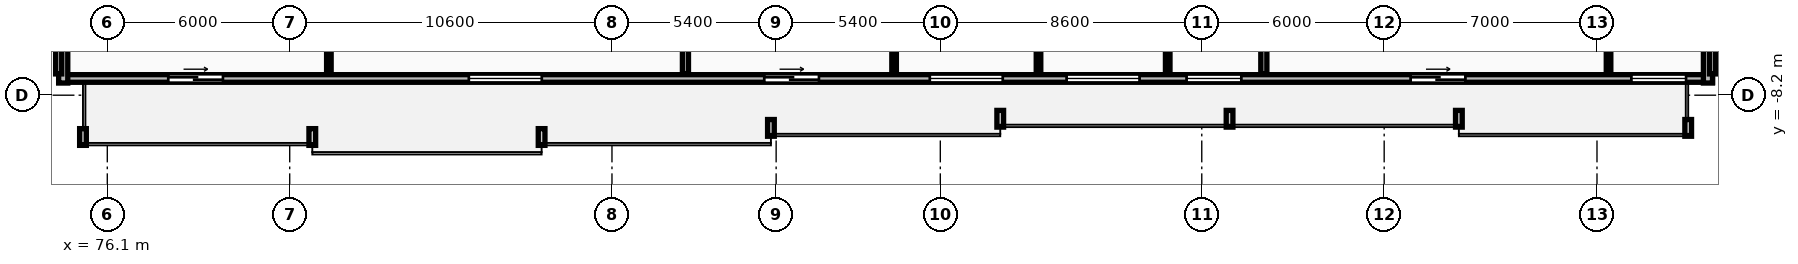
"""IFC4 building model, lengths in metres.
Left out: names, types, materials, properties, quantities, classifications, styles, units other than length and angle.
Written with IfcOpenShell. Run it as: python <this file> out.ifc"""

import sys

from ifc_helpers import new_model, si_unit, direction, frame, frame_2d, origin, place, context, subcontext, project, spatial, rectangle, extrude, element, fill, save


model = new_model("IFC4")
c1 = context("Model", 3, precision=1e-05, world=origin(), true_north=direction((0.0, 1.0)))
c2 = subcontext(c1, "Body", "Model", "MODEL_VIEW")
j1 = project(units=[si_unit("LENGTHUNIT", "METRE"), si_unit("PLANEANGLEUNIT", "RADIAN")], contexts=[c1])
p1 = place(None, origin())
s1 = spatial("IfcSite", under=j1, at=p1, CompositionType="ELEMENT")
p2 = place(p1, origin())
s2 = spatial("IfcBuilding", under=s1, at=p2, CompositionType="ELEMENT")
p3 = place(p2, frame((0.0, 0.0, 201.1)))
s3 = spatial("IfcBuildingStorey", under=s2, at=p3, CompositionType="ELEMENT", Elevation=201.1)
p4 = place(p3, frame((74.5, -7.65, 0.0), z_axis=(0.0, 0.0, 1.0), x_axis=(1.0, 0.0, 0.0)))
e1 = element("IfcWall", 1, at=p4, inside=s3, PredefinedType="STANDARD", context=c2, shape_type="SweptSolid", body=[
    extrude(rectangle(XDim=54.4, YDim=0.25, at=frame_2d((27.2, 0.0))), origin(), (0.0, 0.0, 1.0), 2.97),
])
p5 = place(p4, frame((3.604, 0.0, 0.0)))
e2 = element("IfcOpeningElement", 2, at=p5, cuts=e1, PredefinedType="OPENING", context=c2, shape_type="SweptSolid", body=[
    extrude(rectangle(XDim=1.8, YDim=2.2, at=frame_2d((0.9, 1.1))), frame((0.0, 0.135, 0.0), z_axis=(0.0, -1.0, 0.0), x_axis=(1.0, 0.0, 0.0)), (0.0, 0.0, 1.0), 0.27),
])
p6 = place(p4, frame((13.492, 0.0, 0.85)))
e3 = element("IfcOpeningElement", 3, at=p6, cuts=e1, PredefinedType="OPENING", context=c2, shape_type="SweptSolid", body=[
    extrude(rectangle(XDim=2.4, YDim=1.9, at=frame_2d((1.2, 0.95))), frame((0.0, 0.135, 0.0), z_axis=(0.0, -1.0, 0.0), x_axis=(1.0, 0.0, 0.0)), (0.0, 0.0, 1.0), 0.27),
])
p7 = place(p4, frame((28.655, 0.0, 0.85)))
e4 = element("IfcOpeningElement", 4, at=p7, cuts=e1, PredefinedType="OPENING", context=c2, shape_type="SweptSolid", body=[
    extrude(rectangle(XDim=2.4, YDim=1.9, at=frame_2d((1.2, 0.95))), frame((0.0, 0.135, 0.0), z_axis=(0.0, -1.0, 0.0), x_axis=(1.0, 0.0, 0.0)), (0.0, 0.0, 1.0), 0.27),
])
p8 = place(p4, frame((33.155, 0.0, 0.85)))
e5 = element("IfcOpeningElement", 5, at=p8, cuts=e1, PredefinedType="OPENING", context=c2, shape_type="SweptSolid", body=[
    extrude(rectangle(XDim=2.4, YDim=1.9, at=frame_2d((1.2, 0.95))), frame((0.0, 0.135, 0.0), z_axis=(0.0, -1.0, 0.0), x_axis=(1.0, 0.0, 0.0)), (0.0, 0.0, 1.0), 0.27),
])
p9 = place(p4, frame((23.208, 0.0, 0.0)))
e6 = element("IfcOpeningElement", 6, at=p9, cuts=e1, PredefinedType="OPENING", context=c2, shape_type="SweptSolid", body=[
    extrude(rectangle(XDim=1.8, YDim=2.2, at=frame_2d((0.9, 1.1))), frame((0.0, 0.135, 0.0), z_axis=(0.0, -1.0, 0.0), x_axis=(1.0, 0.0, 0.0)), (0.0, 0.0, 1.0), 0.27),
])
p10 = place(p4, frame((37.101, 0.0, 0.85)))
e7 = element("IfcOpeningElement", 7, at=p10, cuts=e1, PredefinedType="OPENING", context=c2, shape_type="SweptSolid", body=[
    extrude(rectangle(XDim=1.8, YDim=1.8, at=frame_2d((0.9, 0.9))), frame((0.0, 0.135, 0.0), z_axis=(0.0, -1.0, 0.0), x_axis=(1.0, 0.0, 0.0)), (0.0, 0.0, 1.0), 0.27),
])
p11 = place(p4, frame((44.471, 0.0, 0.0)))
e8 = element("IfcOpeningElement", 8, at=p11, cuts=e1, PredefinedType="OPENING", context=c2, shape_type="SweptSolid", body=[
    extrude(rectangle(XDim=1.8, YDim=2.2, at=frame_2d((0.9, 1.1))), frame((0.0, 0.135, 0.0), z_axis=(0.0, -1.0, 0.0), x_axis=(1.0, 0.0, 0.0)), (0.0, 0.0, 1.0), 0.27),
])
p12 = place(p4, frame((51.73, 0.0, 0.85)))
e9 = element("IfcOpeningElement", 9, at=p12, cuts=e1, PredefinedType="OPENING", context=c2, shape_type="SweptSolid", body=[
    extrude(rectangle(XDim=1.8, YDim=1.8, at=frame_2d((0.9, 0.9))), frame((0.0, 0.135, 0.0), z_axis=(0.0, -1.0, 0.0), x_axis=(1.0, 0.0, 0.0)), (0.0, 0.0, 1.0), 0.27),
])
for number, where, z_axis, x_axis in (
    (10, (128.75, -7.8, 0.0), (0.0, 0.0, 1.0), (0.0, 1.0, 0.0)),
    (11, (74.65, -4.2, 0.0), (0.0, 0.0, 1.0), (0.0, -1.0, 0.0)),
):
    element("IfcWall", number, at=place(p3, frame(where, z_axis=z_axis, x_axis=x_axis)), inside=s3, PredefinedType="STANDARD", context=c2, shape_type="SweptSolid", body=[
        extrude(rectangle(XDim=3.6, YDim=0.3, at=frame_2d((1.8, 0.0))), origin(), (0.0, 0.0, 1.0), 2.97),
    ])
for number, where, z_axis, x_axis in (
    (12, (74.5, -7.5, 0.0), (0.0, 0.0, 1.0), (0.0, 1.0, 0.0)),
    (13, (128.9, -7.5, 0.0), (0.0, 0.0, 1.0), (0.0, 1.0, 0.0)),
):
    element("IfcWall", number, at=place(p3, frame(where, z_axis=z_axis, x_axis=x_axis)), inside=s3, PredefinedType="PARTITIONING", context=c2, shape_type="SweptSolid", body=[
        extrude(rectangle(XDim=23.07, YDim=0.2, at=frame_2d((11.535, 0.0))), origin(), (0.0, 0.0, 1.0), 2.2),
    ])
p13 = place(p3, frame((95.117, -7.5, 0.0), z_axis=(0.0, 0.0, 1.0), x_axis=(0.0, 1.0, 0.0)))
e14 = element("IfcWall", 14, at=p13, inside=s3, PredefinedType="PARTITIONING", context=c2, shape_type="SweptSolid", body=[
    extrude(rectangle(XDim=23.07, YDim=0.2, at=frame_2d((11.535, 0.0))), origin(), (0.0, 0.0, 1.0), 2.97),
])
p14 = place(p3, frame((83.388, -7.5, 0.0), z_axis=(0.0, 0.0, 1.0), x_axis=(0.0, 1.0, 0.0)))
e15 = element("IfcWall", 15, at=p14, inside=s3, PredefinedType="PARTITIONING", context=c2, shape_type="SweptSolid", body=[
    extrude(rectangle(XDim=5.17, YDim=0.15, at=frame_2d((2.585, 0.0))), origin(), (0.0, 0.0, 1.0), 2.97),
])
p15 = place(p3, frame((114.142, -7.5, 0.0), z_axis=(0.0, 0.0, 1.0), x_axis=(0.0, 1.0, 0.0)))
e16 = element("IfcWall", 16, at=p15, inside=s3, PredefinedType="PARTITIONING", context=c2, shape_type="SweptSolid", body=[
    extrude(rectangle(XDim=23.07, YDim=0.2, at=frame_2d((11.535, 0.0))), origin(), (0.0, 0.0, 1.0), 2.97),
])
p16 = place(p3, frame((106.73, -7.5, 0.0), z_axis=(0.0, 0.0, 1.0), x_axis=(0.0, 1.0, 0.0)))
e17 = element("IfcWall", 17, at=p16, inside=s3, PredefinedType="PARTITIONING", context=c2, shape_type="SweptSolid", body=[
    extrude(rectangle(XDim=5.17, YDim=0.15, at=frame_2d((2.585, 0.0))), origin(), (0.0, 0.0, 1.0), 2.97),
])
p17 = place(p3, frame((101.98, -7.5, 0.0), z_axis=(0.0, 0.0, 1.0), x_axis=(0.0, 1.0, 0.0)))
e18 = element("IfcWall", 18, at=p17, inside=s3, PredefinedType="PARTITIONING", context=c2, shape_type="SweptSolid", body=[
    extrude(rectangle(XDim=10.31, YDim=0.15, at=frame_2d((5.155, 0.0))), origin(), (0.0, 0.0, 1.0), 2.97),
])
p18 = place(p17, frame((5.57, 0.0, 0.0)))
e19 = element("IfcOpeningElement", 19, at=p18, cuts=e18, PredefinedType="OPENING", context=c2, shape_type="SweptSolid", body=[
    extrude(rectangle(XDim=0.92, YDim=2.08, at=frame_2d((0.46, 1.04))), frame((0.0, 0.085, 0.0), z_axis=(0.0, -1.0, 0.0), x_axis=(1.0, 0.0, 0.0)), (0.0, 0.0, 1.0), 0.17),
])
p19 = place(p3, frame((110.98, -7.5, 0.0), z_axis=(0.0, 0.0, 1.0), x_axis=(0.0, 1.0, 0.0)))
e20 = element("IfcWall", 20, at=p19, inside=s3, PredefinedType="PARTITIONING", context=c2, shape_type="SweptSolid", body=[
    extrude(rectangle(XDim=7.8, YDim=0.15, at=frame_2d((3.9, 0.0))), origin(), (0.0, 0.0, 1.0), 2.97),
])
p20 = place(p19, frame((5.57, 0.0, 0.0)))
e21 = element("IfcOpeningElement", 21, at=p20, cuts=e20, PredefinedType="OPENING", context=c2, shape_type="SweptSolid", body=[
    extrude(rectangle(XDim=0.92, YDim=2.08, at=frame_2d((0.46, 1.04))), frame((0.0, 0.085, 0.0), z_axis=(0.0, -1.0, 0.0), x_axis=(1.0, 0.0, 0.0)), (0.0, 0.0, 1.0), 0.17),
])
p21 = place(p3, frame((125.48, -7.5, 0.0), z_axis=(0.0, 0.0, 1.0), x_axis=(0.0, 1.0, 0.0)))
e22 = element("IfcWall", 22, at=p21, inside=s3, PredefinedType="PARTITIONING", context=c2, shape_type="SweptSolid", body=[
    extrude(rectangle(XDim=10.31, YDim=0.15, at=frame_2d((5.155, 0.0))), origin(), (0.0, 0.0, 1.0), 2.97),
])
p22 = place(p21, frame((5.55, 0.0, 0.0)))
e23 = element("IfcOpeningElement", 23, at=p22, cuts=e22, PredefinedType="OPENING", context=c2, shape_type="SweptSolid", body=[
    extrude(rectangle(XDim=0.84, YDim=2.04, at=frame_2d((0.42, 1.02))), frame((0.0, 0.085, 0.0), z_axis=(0.0, -1.0, 0.0), x_axis=(1.0, 0.0, 0.0)), (0.0, 0.0, 1.0), 0.17),
])
p23 = place(p21, frame((8.04, 0.0, 0.0)))
e24 = element("IfcOpeningElement", 24, at=p23, cuts=e22, PredefinedType="OPENING", context=c2, shape_type="SweptSolid", body=[
    extrude(rectangle(XDim=0.84, YDim=2.04, at=frame_2d((0.42, 1.02))), frame((0.0, 0.085, 0.0), z_axis=(0.0, -1.0, 0.0), x_axis=(1.0, 0.0, 0.0)), (0.0, 0.0, 1.0), 0.17),
])
p24 = place(p21, frame((0.818, 0.0, 0.0)))
e25 = element("IfcOpeningElement", 25, at=p24, cuts=e22, PredefinedType="OPENING", context=c2, shape_type="SweptSolid", body=[
    extrude(rectangle(XDim=0.88, YDim=2.06, at=frame_2d((0.44, 1.03))), frame((0.0, 0.085, 0.0), z_axis=(0.0, -1.0, 0.0), x_axis=(1.0, 0.0, 0.0)), (0.0, 0.0, 1.0), 0.17),
])
p25 = place(p5, origin())
e26 = element("IfcDoor", 26, at=p25, inside=s3, OperationType="SLIDING_TO_RIGHT", PredefinedType="DOOR", context=c2, shape_type="SweptSolid", body=[
    extrude(rectangle(XDim=1.8, YDim=2.2, at=frame_2d((0.9, 1.1))), frame((0.0, 0.025, 0.0), z_axis=(0.0, -1.0, 0.0), x_axis=(1.0, 0.0, 0.0)), (0.0, 0.0, 1.0), 0.05),
])
fill(e2, e26)
p26 = place(p6, origin())
e27 = element("IfcWindow", 27, at=p26, inside=s3, PartitioningType="DOUBLE_PANEL_VERTICAL", PredefinedType="WINDOW", context=c2, shape_type="SweptSolid", body=[
    extrude(rectangle(XDim=2.4, YDim=1.9, at=frame_2d((1.2, 0.95))), frame((0.0, 0.03, 0.0), z_axis=(0.0, -1.0, 0.0), x_axis=(1.0, 0.0, 0.0)), (0.0, 0.0, 1.0), 0.06),
])
fill(e3, e27)
p27 = place(p7, origin())
e28 = element("IfcWindow", 28, at=p27, inside=s3, PartitioningType="DOUBLE_PANEL_VERTICAL", PredefinedType="WINDOW", context=c2, shape_type="SweptSolid", body=[
    extrude(rectangle(XDim=2.4, YDim=1.9, at=frame_2d((1.2, 0.95))), frame((0.0, 0.03, 0.0), z_axis=(0.0, -1.0, 0.0), x_axis=(1.0, 0.0, 0.0)), (0.0, 0.0, 1.0), 0.06),
])
fill(e4, e28)
p28 = place(p8, origin())
e29 = element("IfcWindow", 29, at=p28, inside=s3, PartitioningType="DOUBLE_PANEL_VERTICAL", PredefinedType="WINDOW", context=c2, shape_type="SweptSolid", body=[
    extrude(rectangle(XDim=2.4, YDim=1.9, at=frame_2d((1.2, 0.95))), frame((0.0, 0.03, 0.0), z_axis=(0.0, -1.0, 0.0), x_axis=(1.0, 0.0, 0.0)), (0.0, 0.0, 1.0), 0.06),
])
fill(e5, e29)
p29 = place(p9, origin())
e30 = element("IfcDoor", 30, at=p29, inside=s3, OperationType="SLIDING_TO_RIGHT", PredefinedType="DOOR", context=c2, shape_type="SweptSolid", body=[
    extrude(rectangle(XDim=1.8, YDim=2.2, at=frame_2d((0.9, 1.1))), frame((0.0, 0.025, 0.0), z_axis=(0.0, -1.0, 0.0), x_axis=(1.0, 0.0, 0.0)), (0.0, 0.0, 1.0), 0.05),
])
fill(e6, e30)
p30 = place(p10, origin())
e31 = element("IfcWindow", 31, at=p30, inside=s3, PartitioningType="SINGLE_PANEL", PredefinedType="WINDOW", context=c2, shape_type="SweptSolid", body=[
    extrude(rectangle(XDim=1.8, YDim=1.8, at=frame_2d((0.9, 0.9))), frame((0.0, 0.03, 0.0), z_axis=(0.0, -1.0, 0.0), x_axis=(1.0, 0.0, 0.0)), (0.0, 0.0, 1.0), 0.06),
])
fill(e7, e31)
p31 = place(p11, origin())
e32 = element("IfcDoor", 32, at=p31, inside=s3, OperationType="SLIDING_TO_RIGHT", PredefinedType="DOOR", context=c2, shape_type="SweptSolid", body=[
    extrude(rectangle(XDim=1.8, YDim=2.2, at=frame_2d((0.9, 1.1))), frame((0.0, 0.025, 0.0), z_axis=(0.0, -1.0, 0.0), x_axis=(1.0, 0.0, 0.0)), (0.0, 0.0, 1.0), 0.05),
])
fill(e8, e32)
p32 = place(p12, origin())
e33 = element("IfcWindow", 33, at=p32, inside=s3, PartitioningType="SINGLE_PANEL", PredefinedType="WINDOW", context=c2, shape_type="SweptSolid", body=[
    extrude(rectangle(XDim=1.8, YDim=1.8, at=frame_2d((0.9, 0.9))), frame((0.0, 0.03, 0.0), z_axis=(0.0, -1.0, 0.0), x_axis=(1.0, 0.0, 0.0)), (0.0, 0.0, 1.0), 0.06),
])
fill(e9, e33)
save(model, sys.argv[1])
